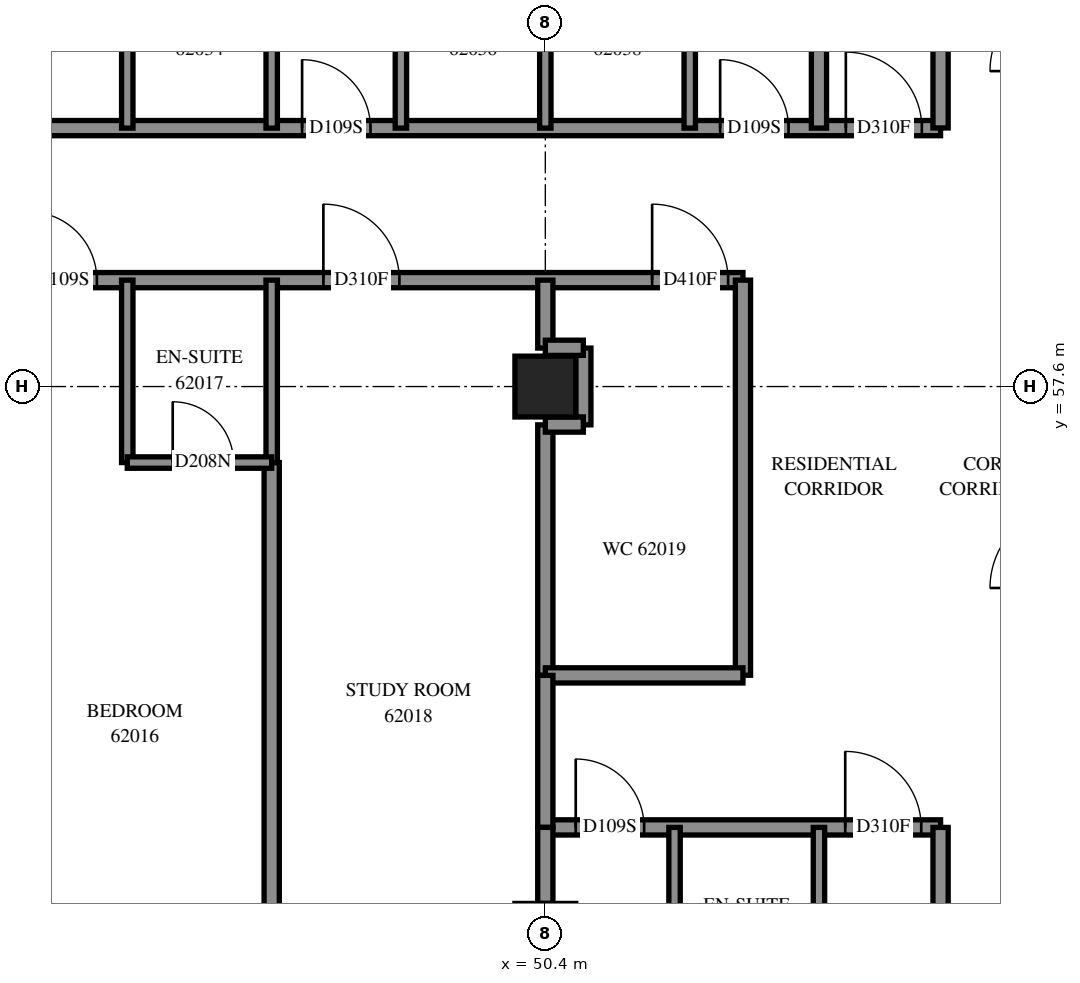
"""IFC4 building model, lengths in metres.
Left out: names, types, materials, properties, quantities, classifications, styles, units other than length and angle.
Written with IfcOpenShell. Run it as: python <this file> out.ifc"""

import sys

from ifc_helpers import new_model, si_unit, direction, frame, frame_2d, origin, origin_2d, place, context, subcontext, project, spatial, rectangle, extrude, element, fill, save


model = new_model("IFC4")
c1 = context("Model", 3, precision=1e-05, world=origin(), true_north=direction((0.0, 1.0)))
c2 = subcontext(c1, "Body", "Model", "MODEL_VIEW")
j1 = project(units=[si_unit("LENGTHUNIT", "METRE"), si_unit("PLANEANGLEUNIT", "RADIAN")], contexts=[c1])
p1 = place(None, origin())
s1 = spatial("IfcSite", under=j1, at=p1, CompositionType="ELEMENT")
p2 = place(p1, origin())
s2 = spatial("IfcBuilding", under=s1, at=p2, CompositionType="ELEMENT")
p3 = place(p2, frame((0.0, 0.0, 227.0)))
s3 = spatial("IfcBuildingStorey", under=s2, at=p3, CompositionType="ELEMENT", Elevation=227.0)
p4 = place(p3, frame((50.4, 57.6, 0.0), z_axis=(0.0, 0.0, 1.0), x_axis=(1.0, 0.0, 0.0)))
e1 = element("IfcColumn", 1, at=p4, inside=s3, PredefinedType="COLUMN", context=c2, shape_type="SweptSolid", body=[
    extrude(rectangle(XDim=0.8, YDim=0.8, at=origin_2d()), origin(), (0.0, 0.0, 1.0), 3.1),
])
p5 = place(p3, frame((36.0, 59.0, 0.0), z_axis=(0.0, 0.0, 1.0), x_axis=(1.0, 0.0, 0.0)))
e2 = element("IfcWall", 2, at=p5, inside=s3, PredefinedType="PARTITIONING", context=c2, shape_type="SweptSolid", body=[
    extrude(rectangle(XDim=17.0, YDim=0.2, at=frame_2d((8.5, 0.0))), origin(), (0.0, 0.0, 1.0), 3.1),
])
p6 = place(p5, frame((3.862, 0.0, 0.0)))
e3 = element("IfcOpeningElement", 3, at=p6, cuts=e2, PredefinedType="OPENING", context=c2, shape_type="SweptSolid", body=[
    extrude(rectangle(XDim=1.0, YDim=2.1, at=frame_2d((0.5, 1.05))), frame((0.0, 0.11, 0.0), z_axis=(0.0, -1.0, 0.0), x_axis=(1.0, 0.0, 0.0)), (0.0, 0.0, 1.0), 0.22),
])
p7 = place(p5, frame((7.6, 0.0, 0.0)))
e4 = element("IfcOpeningElement", 4, at=p7, cuts=e2, PredefinedType="OPENING", context=c2, shape_type="SweptSolid", body=[
    extrude(rectangle(XDim=0.9, YDim=2.1, at=frame_2d((0.45, 1.05))), frame((0.0, 0.11, 0.0), z_axis=(0.0, -1.0, 0.0), x_axis=(1.0, 0.0, 0.0)), (0.0, 0.0, 1.0), 0.22),
])
p8 = place(p5, frame((11.48, 0.0, 0.0)))
e5 = element("IfcOpeningElement", 5, at=p8, cuts=e2, PredefinedType="OPENING", context=c2, shape_type="SweptSolid", body=[
    extrude(rectangle(XDim=1.0, YDim=2.1, at=frame_2d((0.5, 1.05))), frame((0.0, 0.11, 0.0), z_axis=(0.0, -1.0, 0.0), x_axis=(1.0, 0.0, 0.0)), (0.0, 0.0, 1.0), 0.22),
])
p9 = place(p5, frame((15.805, 0.0, 0.0)))
e6 = element("IfcOpeningElement", 6, at=p9, cuts=e2, PredefinedType="OPENING", context=c2, shape_type="SweptSolid", body=[
    extrude(rectangle(XDim=1.0, YDim=2.1, at=frame_2d((0.5, 1.05))), frame((0.0, 0.11, 0.0), z_axis=(0.0, -1.0, 0.0), x_axis=(1.0, 0.0, 0.0)), (0.0, 0.0, 1.0), 0.22),
])
p10 = place(p3, frame((40.602, 61.0, 0.0), z_axis=(0.0, 0.0, 1.0), x_axis=(1.0, 0.0, 0.0)))
e7 = element("IfcWall", 7, at=p10, inside=s3, PredefinedType="PARTITIONING", context=c2, shape_type="SweptSolid", body=[
    extrude(rectangle(XDim=14.998, YDim=0.2, at=frame_2d((7.499, 0.0))), origin(), (0.0, 0.0, 1.0), 3.1),
])
p11 = place(p10, frame((1.306, 0.0, 0.0)))
e8 = element("IfcOpeningElement", 8, at=p11, cuts=e7, PredefinedType="OPENING", context=c2, shape_type="SweptSolid", body=[
    extrude(rectangle(XDim=0.9, YDim=2.1, at=frame_2d((0.45, 1.05))), frame((0.0, 0.11, 0.0), z_axis=(0.0, -1.0, 0.0), x_axis=(1.0, 0.0, 0.0)), (0.0, 0.0, 1.0), 0.22),
])
p12 = place(p10, frame((6.598, 0.0, 0.0)))
e9 = element("IfcOpeningElement", 9, at=p12, cuts=e7, PredefinedType="OPENING", context=c2, shape_type="SweptSolid", body=[
    extrude(rectangle(XDim=0.9, YDim=2.1, at=frame_2d((0.45, 1.05))), frame((0.0, 0.11, 0.0), z_axis=(0.0, -1.0, 0.0), x_axis=(1.0, 0.0, 0.0)), (0.0, 0.0, 1.0), 0.22),
])
p13 = place(p10, frame((12.098, 0.0, 0.0)))
e10 = element("IfcOpeningElement", 10, at=p13, cuts=e7, PredefinedType="OPENING", context=c2, shape_type="SweptSolid", body=[
    extrude(rectangle(XDim=0.9, YDim=2.1, at=frame_2d((0.45, 1.05))), frame((0.0, 0.11, 0.0), z_axis=(0.0, -1.0, 0.0), x_axis=(1.0, 0.0, 0.0)), (0.0, 0.0, 1.0), 0.22),
])
p14 = place(p10, frame((13.752, 0.0, 0.0)))
e11 = element("IfcOpeningElement", 11, at=p14, cuts=e7, PredefinedType="OPENING", context=c2, shape_type="SweptSolid", body=[
    extrude(rectangle(XDim=1.0, YDim=2.1, at=frame_2d((0.5, 1.05))), frame((0.0, 0.11, 0.0), z_axis=(0.0, -1.0, 0.0), x_axis=(1.0, 0.0, 0.0)), (0.0, 0.0, 1.0), 0.22),
])
p15 = place(p3, frame((54.0, 61.0, 0.0), z_axis=(0.0, 0.0, 1.0), x_axis=(0.0, 1.0, 0.0)))
e12 = element("IfcWall", 12, at=p15, inside=s3, PredefinedType="PARTITIONING", context=c2, shape_type="SweptSolid", body=[
    extrude(rectangle(XDim=11.811, YDim=0.2, at=frame_2d((5.905, 0.0))), origin(), (0.0, 0.0, 1.0), 3.1),
])
p16 = place(p3, frame((46.8, 49.7, 0.0), z_axis=(0.0, 0.0, 1.0), x_axis=(0.0, 1.0, 0.0)))
e13 = element("IfcWall", 13, at=p16, inside=s3, PredefinedType="PARTITIONING", context=c2, shape_type="SweptSolid", body=[
    extrude(rectangle(XDim=6.9, YDim=0.2, at=frame_2d((3.45, 0.0))), origin(), (0.0, 0.0, 1.0), 3.1),
])
p17 = place(p3, frame((55.6, 61.002, 0.0), z_axis=(0.0, 0.0, 1.0), x_axis=(0.0, 1.0, 0.0)))
e14 = element("IfcWall", 14, at=p17, inside=s3, PredefinedType="PARTITIONING", context=c2, shape_type="SweptSolid", body=[
    extrude(rectangle(XDim=5.798, YDim=0.2, at=frame_2d((2.899, 0.0))), origin(), (0.0, 0.0, 1.0), 3.1),
])
p18 = place(p3, frame((50.4, 51.8, 0.0), z_axis=(0.0, 0.0, 1.0), x_axis=(1.0, 0.0, 0.0)))
e15 = element("IfcWall", 15, at=p18, inside=s3, PredefinedType="PARTITIONING", context=c2, shape_type="SweptSolid", body=[
    extrude(rectangle(XDim=5.2, YDim=0.2, at=frame_2d((2.6, 0.0))), origin(), (0.0, 0.0, 1.0), 3.1),
])
p19 = place(p18, frame((0.4, 0.0, 0.0)))
e16 = element("IfcOpeningElement", 16, at=p19, cuts=e15, PredefinedType="OPENING", context=c2, shape_type="SweptSolid", body=[
    extrude(rectangle(XDim=0.9, YDim=2.1, at=frame_2d((0.45, 1.05))), frame((0.0, 0.11, 0.0), z_axis=(0.0, -1.0, 0.0), x_axis=(1.0, 0.0, 0.0)), (0.0, 0.0, 1.0), 0.22),
])
p20 = place(p18, frame((3.946, 0.0, 0.0)))
e17 = element("IfcOpeningElement", 17, at=p20, cuts=e15, PredefinedType="OPENING", context=c2, shape_type="SweptSolid", body=[
    extrude(rectangle(XDim=1.0, YDim=2.1, at=frame_2d((0.5, 1.05))), frame((0.0, 0.11, 0.0), z_axis=(0.0, -1.0, 0.0), x_axis=(1.0, 0.0, 0.0)), (0.0, 0.0, 1.0), 0.22),
])
p21 = place(p3, frame((53.0, 53.802, 0.0), z_axis=(0.0, 0.0, 1.0), x_axis=(0.0, 1.0, 0.0)))
e18 = element("IfcWall", 18, at=p21, inside=s3, PredefinedType="PARTITIONING", context=c2, shape_type="SweptSolid", body=[
    extrude(rectangle(XDim=5.198, YDim=0.2, at=frame_2d((2.599, 0.0))), origin(), (0.0, 0.0, 1.0), 3.1),
])
p22 = place(p3, frame((55.6, 48.4, 0.0), z_axis=(0.0, 0.0, 1.0), x_axis=(0.0, 1.0, 0.0)))
e19 = element("IfcWall", 19, at=p22, inside=s3, PredefinedType="PARTITIONING", context=c2, shape_type="SweptSolid", body=[
    extrude(rectangle(XDim=3.4, YDim=0.2, at=frame_2d((1.7, 0.0))), origin(), (0.0, 0.0, 1.0), 3.1),
])
p23 = place(p3, frame((50.4, 53.8, 0.0), z_axis=(0.0, 0.0, 1.0), x_axis=(0.0, 1.0, 0.0)))
e20 = element("IfcWall", 20, at=p23, inside=s3, PredefinedType="PARTITIONING", context=c2, shape_type="SweptSolid", body=[
    extrude(rectangle(XDim=3.296, YDim=0.2, at=frame_2d((1.648, 0.0))), origin(), (0.0, 0.0, 1.0), 3.1),
])
p24 = place(p3, frame((50.4, 53.8, 0.0), z_axis=(0.0, 0.0, 1.0), x_axis=(1.0, 0.0, 0.0)))
e21 = element("IfcWall", 21, at=p24, inside=s3, PredefinedType="PARTITIONING", context=c2, shape_type="SweptSolid", body=[
    extrude(rectangle(XDim=2.6, YDim=0.2, at=frame_2d((1.3, 0.0))), origin(), (0.0, 0.0, 1.0), 3.1),
])
for number, where, z_axis, x_axis in (
    (22, (44.9, 56.6, 0.0), (0.0, 0.0, 1.0), (0.0, 1.0, 0.0)),
    (23, (44.9, 61.0, 0.0), (0.0, 0.0, 1.0), (0.0, 1.0, 0.0)),
    (24, (46.8, 56.6, 0.0), (0.0, 0.0, 1.0), (0.0, 1.0, 0.0)),
    (25, (46.8, 61.0, 0.0), (0.0, 0.0, 1.0), (0.0, 1.0, 0.0)),
    (26, (48.5, 61.0, 0.0), (0.0, 0.0, 1.0), (0.0, 1.0, 0.0)),
    (27, (50.4, 61.0, 0.0), (0.0, 0.0, 1.0), (0.0, 1.0, 0.0)),
    (28, (52.3, 61.0, 0.0), (0.0, 0.0, 1.0), (0.0, 1.0, 0.0)),
    (29, (52.1, 49.4, 0.0), (0.0, 0.0, 1.0), (0.0, 1.0, 0.0)),
    (30, (54.0, 49.4, 0.0), (0.0, 0.0, 1.0), (0.0, 1.0, 0.0)),
):
    element("IfcWall", number, at=place(p3, frame(where, z_axis=z_axis, x_axis=x_axis)), inside=s3, PredefinedType="PARTITIONING", context=c2, shape_type="SweptSolid", body=[
        extrude(rectangle(XDim=2.4, YDim=0.15, at=frame_2d((1.2, 0.0))), origin(), (0.0, 0.0, 1.0), 3.1),
    ])
p25 = place(p3, frame((50.4, 51.8, 0.0), z_axis=(0.0, 0.0, 1.0), x_axis=(0.0, 1.0, 0.0)))
e31 = element("IfcWall", 31, at=p25, inside=s3, PredefinedType="PARTITIONING", context=c2, shape_type="SweptSolid", body=[
    extrude(rectangle(XDim=2.0, YDim=0.2, at=frame_2d((1.0, 0.0))), origin(), (0.0, 0.0, 1.0), 3.1),
])
p26 = place(p3, frame((44.9, 56.6, 0.0), z_axis=(0.0, 0.0, 1.0), x_axis=(1.0, 0.0, 0.0)))
e32 = element("IfcWall", 32, at=p26, inside=s3, PredefinedType="PARTITIONING", context=c2, shape_type="SweptSolid", body=[
    extrude(rectangle(XDim=1.9, YDim=0.15, at=frame_2d((0.95, 0.0))), origin(), (0.0, 0.0, 1.0), 3.1),
])
p27 = place(p26, frame((0.598, 0.0, 0.0)))
e33 = element("IfcOpeningElement", 33, at=p27, cuts=e32, PredefinedType="OPENING", context=c2, shape_type="SweptSolid", body=[
    extrude(rectangle(XDim=0.8, YDim=2.1, at=frame_2d((0.4, 1.05))), frame((0.0, 0.085, 0.0), z_axis=(0.0, -1.0, 0.0), x_axis=(1.0, 0.0, 0.0)), (0.0, 0.0, 1.0), 0.17),
])
p28 = place(p3, frame((50.9, 57.096, 0.0), z_axis=(0.0, 0.0, 1.0), x_axis=(0.0, 1.0, 0.0)))
e34 = element("IfcWall", 34, at=p28, inside=s3, PredefinedType="PARTITIONING", context=c2, shape_type="SweptSolid", body=[
    extrude(rectangle(XDim=1.01, YDim=0.2, at=frame_2d((0.505, 0.0))), origin(), (0.0, 0.0, 1.0), 3.1),
])
p29 = place(p3, frame((50.4, 50.8, 0.0), z_axis=(0.0, 0.0, 1.0), x_axis=(0.0, 1.0, 0.0)))
e35 = element("IfcWall", 35, at=p29, inside=s3, PredefinedType="PARTITIONING", context=c2, shape_type="SweptSolid", body=[
    extrude(rectangle(XDim=1.0, YDim=0.2, at=frame_2d((0.5, 0.0))), origin(), (0.0, 0.0, 1.0), 3.1),
])
p30 = place(p3, frame((50.4, 58.106, 0.0), z_axis=(0.0, 0.0, 1.0), x_axis=(0.0, 1.0, 0.0)))
e36 = element("IfcWall", 36, at=p30, inside=s3, PredefinedType="PARTITIONING", context=c2, shape_type="SweptSolid", body=[
    extrude(rectangle(XDim=0.894, YDim=0.2, at=frame_2d((0.447, 0.0))), origin(), (0.0, 0.0, 1.0), 3.1),
])
for number, where, z_axis, x_axis in (
    (37, (50.4, 58.11, 0.0), (0.0, 0.0, 1.0), (1.0, 0.0, 0.0)),
    (38, (50.4, 57.1, 0.0), (0.0, 0.0, 1.0), (1.0, 0.0, 0.0)),
):
    element("IfcWall", number, at=place(p3, frame(where, z_axis=z_axis, x_axis=x_axis)), inside=s3, PredefinedType="PARTITIONING", context=c2, shape_type="SweptSolid", body=[
        extrude(rectangle(XDim=0.5, YDim=0.2, at=frame_2d((0.25, 0.0))), origin(), (0.0, 0.0, 1.0), 3.1),
    ])
p31 = place(p7, origin())
e39 = element("IfcDoor", 39, at=p31, inside=s3, OperationType="SINGLE_SWING_LEFT", PredefinedType="DOOR", context=c2, shape_type="SweptSolid", body=[
    extrude(rectangle(XDim=0.9, YDim=2.1, at=frame_2d((0.45, 1.05))), frame((0.0, 0.025, 0.0), z_axis=(0.0, -1.0, 0.0), x_axis=(1.0, 0.0, 0.0)), (0.0, 0.0, 1.0), 0.05),
])
fill(e4, e39)
p32 = place(p27, origin())
e40 = element("IfcDoor", 40, at=p32, inside=s3, OperationType="SINGLE_SWING_RIGHT", PredefinedType="DOOR", context=c2, shape_type="SweptSolid", body=[
    extrude(rectangle(XDim=0.8, YDim=2.1, at=frame_2d((0.4, 1.05))), frame((0.0, 0.025, 0.0), z_axis=(0.0, -1.0, 0.0), x_axis=(1.0, 0.0, 0.0)), (0.0, 0.0, 1.0), 0.05),
])
fill(e33, e40)
p33 = place(p8, origin())
e41 = element("IfcDoor", 41, at=p33, inside=s3, OperationType="SINGLE_SWING_RIGHT", PredefinedType="DOOR", context=c2, shape_type="SweptSolid", body=[
    extrude(rectangle(XDim=1.0, YDim=2.1, at=frame_2d((0.5, 1.05))), frame((0.0, 0.025, 0.0), z_axis=(0.0, -1.0, 0.0), x_axis=(1.0, 0.0, 0.0)), (0.0, 0.0, 1.0), 0.05),
])
fill(e5, e41)
p34 = place(p9, origin())
e42 = element("IfcDoor", 42, at=p34, inside=s3, OperationType="SINGLE_SWING_LEFT", PredefinedType="DOOR", context=c2, shape_type="SweptSolid", body=[
    extrude(rectangle(XDim=1.0, YDim=2.1, at=frame_2d((0.5, 1.05))), frame((0.0, 0.025, 0.0), z_axis=(0.0, -1.0, 0.0), x_axis=(1.0, 0.0, 0.0)), (0.0, 0.0, 1.0), 0.05),
])
fill(e6, e42)
p35 = place(p19, origin())
e43 = element("IfcDoor", 43, at=p35, inside=s3, OperationType="SINGLE_SWING_LEFT", PredefinedType="DOOR", context=c2, shape_type="SweptSolid", body=[
    extrude(rectangle(XDim=0.9, YDim=2.1, at=frame_2d((0.45, 1.05))), frame((0.0, 0.025, 0.0), z_axis=(0.0, -1.0, 0.0), x_axis=(1.0, 0.0, 0.0)), (0.0, 0.0, 1.0), 0.05),
])
fill(e16, e43)
p36 = place(p20, origin())
e44 = element("IfcDoor", 44, at=p36, inside=s3, OperationType="SINGLE_SWING_RIGHT", PredefinedType="DOOR", context=c2, shape_type="SweptSolid", body=[
    extrude(rectangle(XDim=1.0, YDim=2.1, at=frame_2d((0.5, 1.05))), frame((0.0, 0.025, 0.0), z_axis=(0.0, -1.0, 0.0), x_axis=(1.0, 0.0, 0.0)), (0.0, 0.0, 1.0), 0.05),
])
fill(e17, e44)
p37 = place(p12, origin())
e45 = element("IfcDoor", 45, at=p37, inside=s3, OperationType="SINGLE_SWING_LEFT", PredefinedType="DOOR", context=c2, shape_type="SweptSolid", body=[
    extrude(rectangle(XDim=0.9, YDim=2.1, at=frame_2d((0.45, 1.05))), frame((0.0, 0.025, 0.0), z_axis=(0.0, -1.0, 0.0), x_axis=(1.0, 0.0, 0.0)), (0.0, 0.0, 1.0), 0.05),
])
fill(e9, e45)
p38 = place(p13, origin())
e46 = element("IfcDoor", 46, at=p38, inside=s3, OperationType="SINGLE_SWING_RIGHT", PredefinedType="DOOR", context=c2, shape_type="SweptSolid", body=[
    extrude(rectangle(XDim=0.9, YDim=2.1, at=frame_2d((0.45, 1.05))), frame((0.0, 0.025, 0.0), z_axis=(0.0, -1.0, 0.0), x_axis=(1.0, 0.0, 0.0)), (0.0, 0.0, 1.0), 0.05),
])
fill(e10, e46)
p39 = place(p14, origin())
e47 = element("IfcDoor", 47, at=p39, inside=s3, OperationType="SINGLE_SWING_LEFT", PredefinedType="DOOR", context=c2, shape_type="SweptSolid", body=[
    extrude(rectangle(XDim=1.0, YDim=2.1, at=frame_2d((0.5, 1.05))), frame((0.0, 0.025, 0.0), z_axis=(0.0, -1.0, 0.0), x_axis=(1.0, 0.0, 0.0)), (0.0, 0.0, 1.0), 0.05),
])
fill(e11, e47)
save(model, sys.argv[1])
